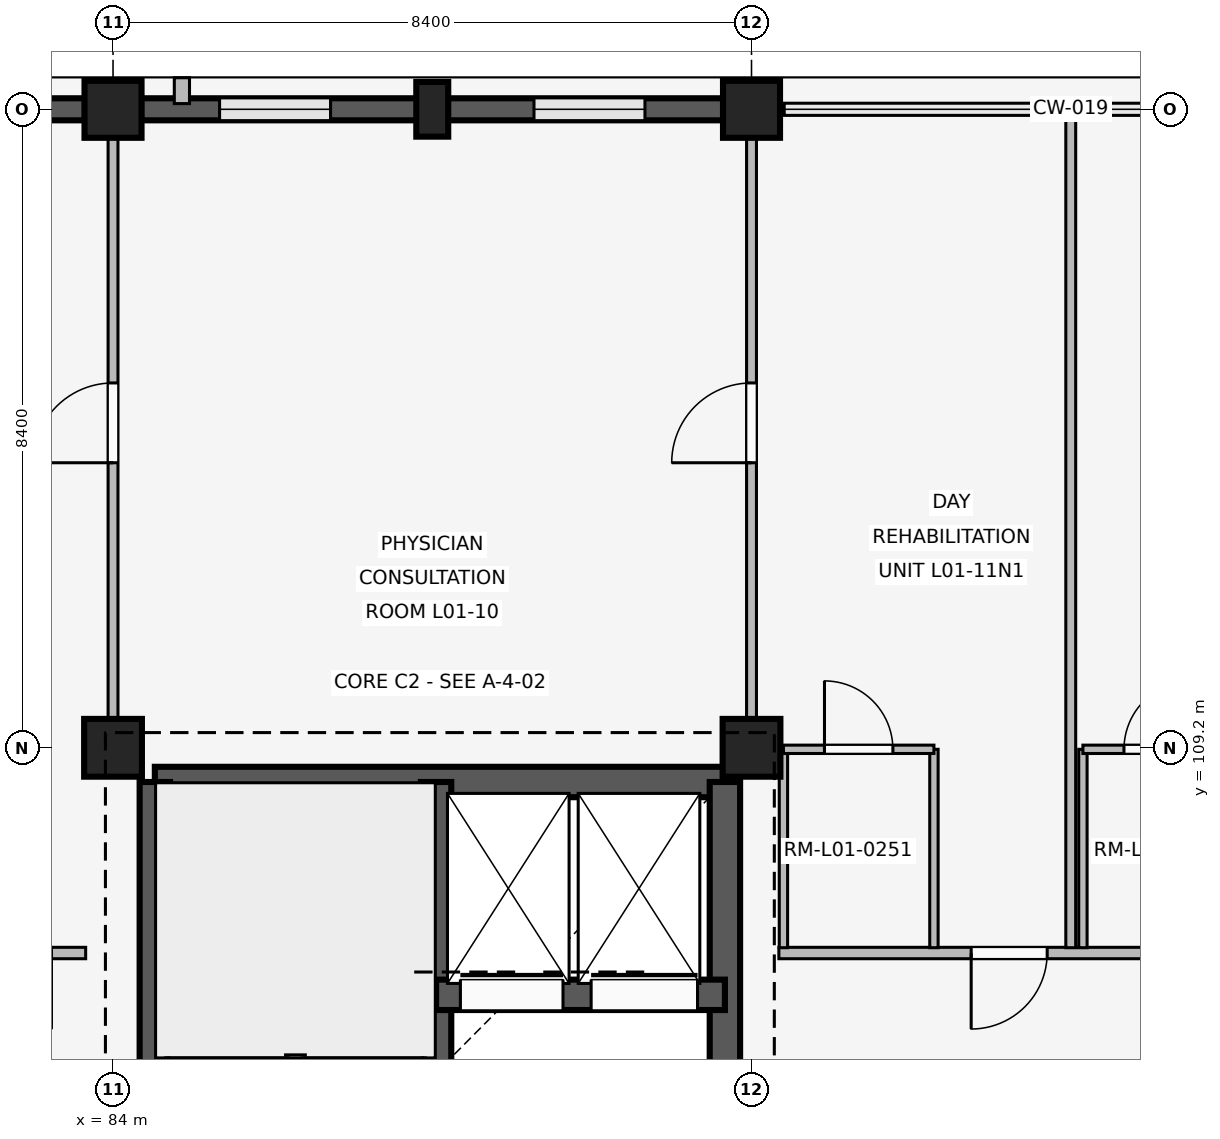
"""IFC4 building model, lengths in metres.
Left out: names, types, materials, properties, quantities, classifications, styles, units other than length and angle.
Written with IfcOpenShell. Run it as: python <this file> out.ifc"""

import sys

from ifc_helpers import new_model, si_unit, direction, frame, frame_2d, origin, origin_2d, place, context, subcontext, project, spatial, rectangle, extrude, element, fill, save


model = new_model("IFC4")
c1 = context("Model", 3, precision=1e-05, world=origin(), true_north=direction((0.0, 1.0)))
c2 = subcontext(c1, "Body", "Model", "MODEL_VIEW")
j1 = project(units=[si_unit("LENGTHUNIT", "METRE"), si_unit("PLANEANGLEUNIT", "RADIAN")], contexts=[c1])
p1 = place(None, origin())
s1 = spatial("IfcSite", under=j1, at=p1, CompositionType="ELEMENT")
p2 = place(p1, origin())
s2 = spatial("IfcBuilding", under=s1, at=p2, CompositionType="ELEMENT")
p3 = place(p2, frame((0.0, 0.0, 4.8)))
s3 = spatial("IfcBuildingStorey", under=s2, at=p3, CompositionType="ELEMENT", Elevation=4.8)
p4 = place(p3, frame((84.0, 109.2, 0.0), z_axis=(0.0, 0.0, 1.0), x_axis=(1.0, 0.0, 0.0)))
e1 = element("IfcColumn", 1, at=p4, inside=s3, PredefinedType="COLUMN", context=c2, shape_type="SweptSolid", body=[
    extrude(rectangle(XDim=0.76, YDim=0.76, at=origin_2d()), origin(), (0.0, 0.0, 1.0), 3.3),
])
p5 = place(p3, frame((84.0, 117.6, 0.0), z_axis=(0.0, 0.0, 1.0), x_axis=(1.0, 0.0, 0.0)))
e2 = element("IfcColumn", 2, at=p5, inside=s3, PredefinedType="COLUMN", context=c2, shape_type="SweptSolid", body=[
    extrude(rectangle(XDim=0.75, YDim=0.75, at=origin_2d()), origin(), (0.0, 0.0, 1.0), 3.3),
])
p6 = place(p3, frame((92.4, 109.2, 0.0), z_axis=(0.0, 0.0, 1.0), x_axis=(1.0, 0.0, 0.0)))
e3 = element("IfcColumn", 3, at=p6, inside=s3, PredefinedType="COLUMN", context=c2, shape_type="SweptSolid", body=[
    extrude(rectangle(XDim=0.76, YDim=0.76, at=origin_2d()), origin(), (0.0, 0.0, 1.0), 3.3),
])
p7 = place(p3, frame((92.4, 117.6, 0.0), z_axis=(0.0, 0.0, 1.0), x_axis=(1.0, 0.0, 0.0)))
e4 = element("IfcColumn", 4, at=p7, inside=s3, PredefinedType="COLUMN", context=c2, shape_type="SweptSolid", body=[
    extrude(rectangle(XDim=0.75, YDim=0.75, at=origin_2d()), origin(), (0.0, 0.0, 1.0), 3.3),
])
p8 = place(p3, frame((88.2, 117.6, 0.0), z_axis=(0.0, 0.0, 1.0), x_axis=(1.0, 0.0, 0.0)))
e5 = element("IfcColumn", 5, at=p8, inside=s3, PredefinedType="PILASTER", context=c2, shape_type="SweptSolid", body=[
    extrude(rectangle(XDim=0.42, YDim=0.72, at=origin_2d()), origin(), (0.0, 0.0, 1.0), 3.3),
])
p9 = place(p3, frame((75.97, 117.6, 0.0), z_axis=(0.0, 0.0, 1.0), x_axis=(1.0, 0.0, 0.0)))
e6 = element("IfcWall", 6, at=p9, inside=s3, PredefinedType="SOLIDWALL", context=c2, shape_type="SweptSolid", body=[
    extrude(rectangle(XDim=7.66, YDim=0.29, at=frame_2d((3.83, 0.0))), origin(), (0.0, 0.0, 1.0), 2.42),
])
p10 = place(p9, frame((0.952, 0.0, 0.85)))
e7 = element("IfcOpeningElement", 7, at=p10, cuts=e6, PredefinedType="OPENING", context=c2, shape_type="SweptSolid", body=[
    extrude(rectangle(XDim=1.62, YDim=0.95, at=frame_2d((0.81, 0.475))), frame((0.0, 0.155, 0.0), z_axis=(0.0, -1.0, 0.0), x_axis=(1.0, 0.0, 0.0)), (0.0, 0.0, 1.0), 0.31),
])
p11 = place(p9, frame((5.088, 0.0, 0.85)))
e8 = element("IfcOpeningElement", 8, at=p11, cuts=e6, PredefinedType="OPENING", context=c2, shape_type="SweptSolid", body=[
    extrude(rectangle(XDim=1.62, YDim=0.95, at=frame_2d((0.81, 0.475))), frame((0.0, 0.155, 0.0), z_axis=(0.0, -1.0, 0.0), x_axis=(1.0, 0.0, 0.0)), (0.0, 0.0, 1.0), 0.31),
])
p12 = place(p3, frame((84.37, 117.6, 0.0), z_axis=(0.0, 0.0, 1.0), x_axis=(1.0, 0.0, 0.0)))
e9 = element("IfcWall", 9, at=p12, inside=s3, PredefinedType="SOLIDWALL", context=c2, shape_type="SweptSolid", body=[
    extrude(rectangle(XDim=7.66, YDim=0.29, at=frame_2d((3.83, 0.0))), origin(), (0.0, 0.0, 1.0), 2.42),
])
p13 = place(p12, frame((1.032, 0.0, 0.85)))
e10 = element("IfcOpeningElement", 10, at=p13, cuts=e9, PredefinedType="OPENING", context=c2, shape_type="SweptSolid", body=[
    extrude(rectangle(XDim=1.46, YDim=0.85, at=frame_2d((0.73, 0.425))), frame((0.0, 0.155, 0.0), z_axis=(0.0, -1.0, 0.0), x_axis=(1.0, 0.0, 0.0)), (0.0, 0.0, 1.0), 0.31),
])
p14 = place(p12, frame((5.168, 0.0, 0.85)))
e11 = element("IfcOpeningElement", 11, at=p14, cuts=e9, PredefinedType="OPENING", context=c2, shape_type="SweptSolid", body=[
    extrude(rectangle(XDim=1.46, YDim=0.85, at=frame_2d((0.73, 0.425))), frame((0.0, 0.155, 0.0), z_axis=(0.0, -1.0, 0.0), x_axis=(1.0, 0.0, 0.0)), (0.0, 0.0, 1.0), 0.31),
])
p15 = place(p3, frame((84.906, 117.675, 0.0), z_axis=(0.0, 0.0, 1.0), x_axis=(0.0, 1.0, 0.0)))
e12 = element("IfcWall", 12, at=p15, inside=s3, PredefinedType="ELEMENTEDWALL", context=c2, shape_type="SweptSolid", body=[
    extrude(rectangle(XDim=0.34, YDim=0.2, at=frame_2d((0.17, 0.0))), origin(), (0.0, 0.0, 1.0), 2.4),
])
p16 = place(p3, frame((84.55, 108.75, 0.0), z_axis=(0.0, 0.0, 1.0), x_axis=(1.0, 0.0, 0.0)))
e13 = element("IfcWall", 13, at=p16, inside=s3, PredefinedType="SHEAR", context=c2, shape_type="SweptSolid", body=[
    extrude(rectangle(XDim=7.5, YDim=0.4, at=frame_2d((3.75, 0.0))), origin(), (0.0, 0.0, 1.0), 3.02),
])
p17 = place(p3, frame((84.55, 101.2, 0.0), z_axis=(0.0, 0.0, 1.0), x_axis=(0.0, 1.0, 0.0)))
e14 = element("IfcWall", 14, at=p17, inside=s3, PredefinedType="SHEAR", context=c2, shape_type="SweptSolid", body=[
    extrude(rectangle(XDim=7.55, YDim=0.4, at=frame_2d((3.775, 0.0))), origin(), (0.0, 0.0, 1.0), 3.02),
])
p18 = place(p17, frame((0.28, 0.0, 0.0)))
e15 = element("IfcOpeningElement", 15, at=p18, cuts=e14, PredefinedType="OPENING", context=c2, shape_type="SweptSolid", body=[
    extrude(rectangle(XDim=1.0, YDim=2.15, at=frame_2d((0.5, 1.075))), frame((0.0, 0.21, 0.0), z_axis=(0.0, -1.0, 0.0), x_axis=(1.0, 0.0, 0.0)), (0.0, 0.0, 1.0), 0.42),
])
p19 = place(p3, frame((92.05, 101.2, 0.0), z_axis=(0.0, 0.0, 1.0), x_axis=(0.0, 1.0, 0.0)))
e16 = element("IfcWall", 16, at=p19, inside=s3, PredefinedType="SHEAR", context=c2, shape_type="SweptSolid", body=[
    extrude(rectangle(XDim=7.55, YDim=0.4, at=frame_2d((3.775, 0.0))), origin(), (0.0, 0.0, 1.0), 3.02),
])
p20 = place(p19, frame((2.4, 0.0, 0.0)))
e17 = element("IfcOpeningElement", 17, at=p20, cuts=e16, PredefinedType="OPENING", context=c2, shape_type="SweptSolid", body=[
    extrude(rectangle(XDim=1.2, YDim=2.2, at=frame_2d((0.6, 1.1))), frame((0.0, 0.21, 0.0), z_axis=(0.0, -1.0, 0.0), x_axis=(1.0, 0.0, 0.0)), (0.0, 0.0, 1.0), 0.42),
])
p21 = place(p3, frame((88.25, 101.2, 0.0), z_axis=(0.0, 0.0, 1.0), x_axis=(0.0, 1.0, 0.0)))
e18 = element("IfcWall", 18, at=p21, inside=s3, PredefinedType="SHEAR", context=c2, shape_type="SweptSolid", body=[
    extrude(rectangle(XDim=7.55, YDim=0.4, at=frame_2d((3.775, 0.0))), origin(), (0.0, 0.0, 1.0), 3.02),
])
p22 = place(p21, frame((0.28, 0.0, 0.0)))
e19 = element("IfcOpeningElement", 19, at=p22, cuts=e18, PredefinedType="OPENING", context=c2, shape_type="SweptSolid", body=[
    extrude(rectangle(XDim=1.0, YDim=2.15, at=frame_2d((0.5, 1.075))), frame((0.0, 0.21, 0.0), z_axis=(0.0, -1.0, 0.0), x_axis=(1.0, 0.0, 0.0)), (0.0, 0.0, 1.0), 0.42),
])
p23 = place(p3, frame((88.25, 105.95, 0.0), z_axis=(0.0, 0.0, 1.0), x_axis=(1.0, 0.0, 0.0)))
e20 = element("IfcWall", 20, at=p23, inside=s3, PredefinedType="SHEAR", context=c2, shape_type="SweptSolid", body=[
    extrude(rectangle(XDim=3.8, YDim=0.4, at=frame_2d((1.9, 0.0))), origin(), (0.0, 0.0, 1.0), 3.02),
])
p24 = place(p23, frame((0.32, 0.0, 0.0)))
e21 = element("IfcOpeningElement", 21, at=p24, cuts=e20, PredefinedType="OPENING", context=c2, shape_type="SweptSolid", body=[
    extrude(rectangle(XDim=1.35, YDim=2.25, at=frame_2d((0.675, 1.125))), frame((0.0, 0.21, 0.0), z_axis=(0.0, -1.0, 0.0), x_axis=(1.0, 0.0, 0.0)), (0.0, 0.0, 1.0), 0.42),
])
p25 = place(p23, frame((2.04, 0.0, 0.0)))
e22 = element("IfcOpeningElement", 22, at=p25, cuts=e20, PredefinedType="OPENING", context=c2, shape_type="SweptSolid", body=[
    extrude(rectangle(XDim=1.4, YDim=2.25, at=frame_2d((0.7, 1.125))), frame((0.0, 0.21, 0.0), z_axis=(0.0, -1.0, 0.0), x_axis=(1.0, 0.0, 0.0)), (0.0, 0.0, 1.0), 0.42),
])
p26 = place(p3, frame((83.64, 106.5, 0.0), z_axis=(0.0, 0.0, 1.0), x_axis=(-1.0, 0.0, 0.0)))
e23 = element("IfcWall", 23, at=p26, inside=s3, PredefinedType="PARTITIONING", context=c2, shape_type="SweptSolid", body=[
    extrude(rectangle(XDim=7.96, YDim=0.15, at=frame_2d((3.98, 0.0))), origin(), (0.0, 0.0, 1.0), 2.4),
])
p27 = place(p26, frame((0.45, 0.0, 0.0)))
e24 = element("IfcOpeningElement", 24, at=p27, cuts=e23, PredefinedType="OPENING", context=c2, shape_type="SweptSolid", body=[
    extrude(rectangle(XDim=1.0, YDim=2.15, at=frame_2d((0.5, 1.075))), frame((0.0, 0.085, 0.0), z_axis=(0.0, -1.0, 0.0), x_axis=(1.0, 0.0, 0.0)), (0.0, 0.0, 1.0), 0.17),
])
p28 = place(p26, frame((4.15, 0.0, 0.0)))
e25 = element("IfcOpeningElement", 25, at=p28, cuts=e23, PredefinedType="OPENING", context=c2, shape_type="SweptSolid", body=[
    extrude(rectangle(XDim=1.0, YDim=2.15, at=frame_2d((0.5, 1.075))), frame((0.0, 0.085, 0.0), z_axis=(0.0, -1.0, 0.0), x_axis=(1.0, 0.0, 0.0)), (0.0, 0.0, 1.0), 0.17),
])
p29 = place(p3, frame((84.0, 109.55, 0.0), z_axis=(0.0, 0.0, 1.0), x_axis=(0.0, 1.0, 0.0)))
e26 = element("IfcWall", 26, at=p29, inside=s3, PredefinedType="PARTITIONING", context=c2, shape_type="SweptSolid", body=[
    extrude(rectangle(XDim=7.91, YDim=0.13, at=frame_2d((3.955, 0.0))), origin(), (0.0, 0.0, 1.0), 2.4),
])
p30 = place(p29, frame((3.4, 0.0, 0.0)))
e27 = element("IfcOpeningElement", 27, at=p30, cuts=e26, PredefinedType="OPENING", context=c2, shape_type="SweptSolid", body=[
    extrude(rectangle(XDim=1.05, YDim=2.2, at=frame_2d((0.525, 1.1))), frame((0.0, 0.075, 0.0), z_axis=(0.0, -1.0, 0.0), x_axis=(1.0, 0.0, 0.0)), (0.0, 0.0, 1.0), 0.15),
])
p31 = place(p3, frame((92.4, 109.55, 0.0), z_axis=(0.0, 0.0, 1.0), x_axis=(0.0, 1.0, 0.0)))
e28 = element("IfcWall", 28, at=p31, inside=s3, PredefinedType="PARTITIONING", context=c2, shape_type="SweptSolid", body=[
    extrude(rectangle(XDim=7.91, YDim=0.13, at=frame_2d((3.955, 0.0))), origin(), (0.0, 0.0, 1.0), 2.4),
])
p32 = place(p31, frame((3.4, 0.0, 0.0)))
e29 = element("IfcOpeningElement", 29, at=p32, cuts=e28, PredefinedType="OPENING", context=c2, shape_type="SweptSolid", body=[
    extrude(rectangle(XDim=1.05, YDim=2.2, at=frame_2d((0.525, 1.1))), frame((0.0, 0.075, 0.0), z_axis=(0.0, -1.0, 0.0), x_axis=(1.0, 0.0, 0.0)), (0.0, 0.0, 1.0), 0.15),
])
p33 = place(p3, frame((100.72, 106.5, 0.0), z_axis=(0.0, 0.0, 1.0), x_axis=(-1.0, 0.0, 0.0)))
e30 = element("IfcWall", 30, at=p33, inside=s3, PredefinedType="PARTITIONING", context=c2, shape_type="SweptSolid", body=[
    extrude(rectangle(XDim=7.96, YDim=0.15, at=frame_2d((3.98, 0.0))), origin(), (0.0, 0.0, 1.0), 2.4),
])
p34 = place(p33, frame((0.73, 0.0, 0.0)))
e31 = element("IfcOpeningElement", 31, at=p34, cuts=e30, PredefinedType="OPENING", context=c2, shape_type="SweptSolid", body=[
    extrude(rectangle(XDim=1.0, YDim=2.15, at=frame_2d((0.5, 1.075))), frame((0.0, 0.085, 0.0), z_axis=(0.0, -1.0, 0.0), x_axis=(1.0, 0.0, 0.0)), (0.0, 0.0, 1.0), 0.17),
])
p35 = place(p33, frame((4.43, 0.0, 0.0)))
e32 = element("IfcOpeningElement", 32, at=p35, cuts=e30, PredefinedType="OPENING", context=c2, shape_type="SweptSolid", body=[
    extrude(rectangle(XDim=1.0, YDim=2.15, at=frame_2d((0.5, 1.075))), frame((0.0, 0.085, 0.0), z_axis=(0.0, -1.0, 0.0), x_axis=(1.0, 0.0, 0.0)), (0.0, 0.0, 1.0), 0.17),
])
p36 = place(p3, frame((96.6, 106.57, 0.0), z_axis=(0.0, 0.0, 1.0), x_axis=(0.0, 1.0, 0.0)))
e33 = element("IfcWall", 33, at=p36, inside=s3, PredefinedType="PARTITIONING", context=c2, shape_type="SweptSolid", body=[
    extrude(rectangle(XDim=10.93, YDim=0.13, at=frame_2d((5.465, 0.0))), origin(), (0.0, 0.0, 1.0), 2.4),
])
for number, where, z_axis, x_axis in (
    (34, (92.82, 106.57, 0.0), (0.0, 0.0, 1.0), (0.0, 1.0, 0.0)),
    (35, (94.8, 106.57, 0.0), (0.0, 0.0, 1.0), (0.0, 1.0, 0.0)),
):
    element("IfcWall", number, at=place(p3, frame(where, z_axis=z_axis, x_axis=x_axis)), inside=s3, PredefinedType="PARTITIONING", context=c2, shape_type="SweptSolid", body=[
        extrude(rectangle(XDim=2.61, YDim=0.11, at=frame_2d((1.305, 0.0))), origin(), (0.0, 0.0, 1.0), 2.4),
    ])
p37 = place(p3, frame((92.82, 109.18, 0.0), z_axis=(0.0, 0.0, 1.0), x_axis=(1.0, 0.0, 0.0)))
e36 = element("IfcWall", 36, at=p37, inside=s3, PredefinedType="PARTITIONING", context=c2, shape_type="SweptSolid", body=[
    extrude(rectangle(XDim=1.98, YDim=0.11, at=frame_2d((0.99, 0.0))), origin(), (0.0, 0.0, 1.0), 2.4),
])
p38 = place(p37, frame((0.54, 0.0, 0.0)))
e37 = element("IfcOpeningElement", 37, at=p38, cuts=e36, PredefinedType="OPENING", context=c2, shape_type="SweptSolid", body=[
    extrude(rectangle(XDim=0.9, YDim=2.1, at=frame_2d((0.45, 1.05))), frame((0.0, 0.065, 0.0), z_axis=(0.0, -1.0, 0.0), x_axis=(1.0, 0.0, 0.0)), (0.0, 0.0, 1.0), 0.13),
])
p39 = place(p3, frame((96.76, 106.57, 0.0), z_axis=(0.0, 0.0, 1.0), x_axis=(0.0, 1.0, 0.0)))
e38 = element("IfcWall", 38, at=p39, inside=s3, PredefinedType="PARTITIONING", context=c2, shape_type="SweptSolid", body=[
    extrude(rectangle(XDim=2.61, YDim=0.11, at=frame_2d((1.305, 0.0))), origin(), (0.0, 0.0, 1.0), 2.4),
])
p40 = place(p3, frame((96.76, 109.18, 0.0), z_axis=(0.0, 0.0, 1.0), x_axis=(1.0, 0.0, 0.0)))
e39 = element("IfcWall", 39, at=p40, inside=s3, PredefinedType="PARTITIONING", context=c2, shape_type="SweptSolid", body=[
    extrude(rectangle(XDim=1.98, YDim=0.11, at=frame_2d((0.99, 0.0))), origin(), (0.0, 0.0, 1.0), 2.4),
])
p41 = place(p40, frame((0.54, 0.0, 0.0)))
e40 = element("IfcOpeningElement", 40, at=p41, cuts=e39, PredefinedType="OPENING", context=c2, shape_type="SweptSolid", body=[
    extrude(rectangle(XDim=0.9, YDim=2.1, at=frame_2d((0.45, 1.05))), frame((0.0, 0.065, 0.0), z_axis=(0.0, -1.0, 0.0), x_axis=(1.0, 0.0, 0.0)), (0.0, 0.0, 1.0), 0.13),
])
p42 = place(p13, origin())
e41 = element("IfcWindow", 41, at=p42, inside=s3, PartitioningType="SINGLE_PANEL", PredefinedType="WINDOW", context=c2, shape_type="SweptSolid", body=[
    extrude(rectangle(XDim=1.46, YDim=0.85, at=frame_2d((0.73, 0.425))), frame((0.0, 0.03, 0.0), z_axis=(0.0, -1.0, 0.0), x_axis=(1.0, 0.0, 0.0)), (0.0, 0.0, 1.0), 0.06),
])
fill(e10, e41)
p43 = place(p14, origin())
e42 = element("IfcWindow", 42, at=p43, inside=s3, PartitioningType="SINGLE_PANEL", PredefinedType="WINDOW", context=c2, shape_type="SweptSolid", body=[
    extrude(rectangle(XDim=1.46, YDim=0.85, at=frame_2d((0.73, 0.425))), frame((0.0, 0.03, 0.0), z_axis=(0.0, -1.0, 0.0), x_axis=(1.0, 0.0, 0.0)), (0.0, 0.0, 1.0), 0.06),
])
fill(e11, e42)
p44 = place(p24, origin())
e43 = element("IfcDoor", 43, at=p44, inside=s3, OperationType="SLIDING_TO_LEFT", PredefinedType="DOOR", context=c2, shape_type="SweptSolid", body=[
    extrude(rectangle(XDim=1.35, YDim=2.25, at=frame_2d((0.675, 1.125))), frame((0.0, 0.025, 0.0), z_axis=(0.0, -1.0, 0.0), x_axis=(1.0, 0.0, 0.0)), (0.0, 0.0, 1.0), 0.05),
])
fill(e21, e43)
p45 = place(p25, origin())
e44 = element("IfcDoor", 44, at=p45, inside=s3, OperationType="SLIDING_TO_LEFT", PredefinedType="DOOR", context=c2, shape_type="SweptSolid", body=[
    extrude(rectangle(XDim=1.4, YDim=2.25, at=frame_2d((0.7, 1.125))), frame((0.0, 0.025, 0.0), z_axis=(0.0, -1.0, 0.0), x_axis=(1.0, 0.0, 0.0)), (0.0, 0.0, 1.0), 0.05),
])
fill(e22, e44)
p46 = place(p30, origin())
e45 = element("IfcDoor", 45, at=p46, inside=s3, OperationType="SINGLE_SWING_LEFT", PredefinedType="DOOR", context=c2, shape_type="SweptSolid", body=[
    extrude(rectangle(XDim=1.05, YDim=2.2, at=frame_2d((0.525, 1.1))), frame((0.0, 0.025, 0.0), z_axis=(0.0, -1.0, 0.0), x_axis=(1.0, 0.0, 0.0)), (0.0, 0.0, 1.0), 0.05),
])
fill(e27, e45)
p47 = place(p32, origin())
e46 = element("IfcDoor", 46, at=p47, inside=s3, OperationType="SINGLE_SWING_LEFT", PredefinedType="DOOR", context=c2, shape_type="SweptSolid", body=[
    extrude(rectangle(XDim=1.05, YDim=2.2, at=frame_2d((0.525, 1.1))), frame((0.0, 0.025, 0.0), z_axis=(0.0, -1.0, 0.0), x_axis=(1.0, 0.0, 0.0)), (0.0, 0.0, 1.0), 0.05),
])
fill(e29, e46)
p48 = place(p35, origin())
e47 = element("IfcDoor", 47, at=p48, inside=s3, OperationType="SINGLE_SWING_RIGHT", PredefinedType="DOOR", context=c2, shape_type="SweptSolid", body=[
    extrude(rectangle(XDim=1.0, YDim=2.15, at=frame_2d((0.5, 1.075))), frame((0.0, 0.025, 0.0), z_axis=(0.0, -1.0, 0.0), x_axis=(1.0, 0.0, 0.0)), (0.0, 0.0, 1.0), 0.05),
])
fill(e32, e47)
p49 = place(p38, origin())
e48 = element("IfcDoor", 48, at=p49, inside=s3, OperationType="SINGLE_SWING_LEFT", PredefinedType="DOOR", context=c2, shape_type="SweptSolid", body=[
    extrude(rectangle(XDim=0.9, YDim=2.1, at=frame_2d((0.45, 1.05))), frame((0.0, 0.025, 0.0), z_axis=(0.0, -1.0, 0.0), x_axis=(1.0, 0.0, 0.0)), (0.0, 0.0, 1.0), 0.05),
])
fill(e37, e48)
p50 = place(p41, origin())
e49 = element("IfcDoor", 49, at=p50, inside=s3, OperationType="SINGLE_SWING_RIGHT", PredefinedType="DOOR", context=c2, shape_type="SweptSolid", body=[
    extrude(rectangle(XDim=0.9, YDim=2.1, at=frame_2d((0.45, 1.05))), frame((0.0, 0.025, 0.0), z_axis=(0.0, -1.0, 0.0), x_axis=(1.0, 0.0, 0.0)), (0.0, 0.0, 1.0), 0.05),
])
fill(e40, e49)
save(model, sys.argv[1])
